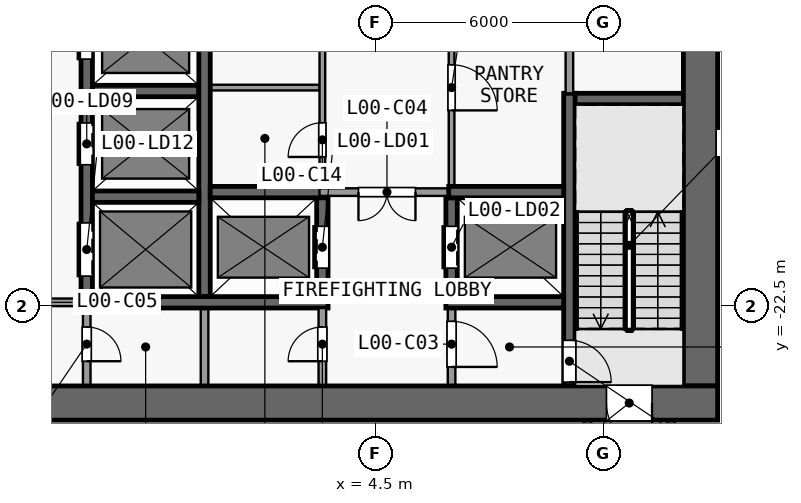
"""IFC4 building model, lengths in metres.
Left out: names, types, materials, properties, quantities, classifications, styles, units other than length and angle.
Written with IfcOpenShell. Run it as: python <this file> out.ifc"""

import sys

from ifc_helpers import new_model, si_unit, direction, frame, frame_2d, origin, place, context, subcontext, project, spatial, rectangle, extrude, element, fill, save


model = new_model("IFC4")
c1 = context("Model", 3, precision=1e-05, world=origin(), true_north=direction((0.0, 1.0)))
c2 = subcontext(c1, "Body", "Model", "MODEL_VIEW")
j1 = project(units=[si_unit("LENGTHUNIT", "METRE"), si_unit("PLANEANGLEUNIT", "RADIAN")], contexts=[c1])
p1 = place(None, origin())
s1 = spatial("IfcSite", under=j1, at=p1, CompositionType="ELEMENT")
p2 = place(p1, origin())
s2 = spatial("IfcBuilding", under=s1, at=p2, CompositionType="ELEMENT")
p3 = place(p2, origin())
s3 = spatial("IfcBuildingStorey", under=s2, at=p3, CompositionType="ELEMENT", Elevation=0.0)
p4 = place(p3, frame((13.5, -25.05, 0.0), z_axis=(0.0, 0.0, 1.0), x_axis=(-1.0, 0.0, 0.0)))
e1 = element("IfcWall", 1, at=p4, inside=s3, PredefinedType="SHEAR", context=c2, shape_type="SweptSolid", body=[
    extrude(rectangle(XDim=27.0, YDim=0.9, at=frame_2d((13.5, 0.0))), origin(), (0.0, 0.0, 1.0), 7.65),
])
p5 = place(p4, frame((24.075, 0.0, 0.0)))
e2 = element("IfcOpeningElement", 2, at=p5, cuts=e1, PredefinedType="OPENING", context=c2, shape_type="SweptSolid", body=[
    extrude(rectangle(XDim=1.2, YDim=2.1, at=frame_2d((0.6, 1.05))), frame((0.0, 0.46, 0.0), z_axis=(0.0, -1.0, 0.0), x_axis=(1.0, 0.0, 0.0)), (0.0, 0.0, 1.0), 0.92),
])
p6 = place(p4, frame((1.725, 0.0, 0.0)))
e3 = element("IfcOpeningElement", 3, at=p6, cuts=e1, PredefinedType="OPENING", context=c2, shape_type="SweptSolid", body=[
    extrude(rectangle(XDim=1.2, YDim=2.1, at=frame_2d((0.6, 1.05))), frame((0.0, 0.46, 0.0), z_axis=(0.0, -1.0, 0.0), x_axis=(1.0, 0.0, 0.0)), (0.0, 0.0, 1.0), 0.92),
])
p7 = place(p3, frame((13.05, -24.6, 0.0), z_axis=(0.0, 0.0, 1.0), x_axis=(0.0, 1.0, 0.0)))
e4 = element("IfcWall", 4, at=p7, inside=s3, PredefinedType="SHEAR", context=c2, shape_type="SweptSolid", body=[
    extrude(rectangle(XDim=16.1, YDim=0.9, at=frame_2d((8.05, 0.0))), origin(), (0.0, 0.0, 1.0), 7.65),
])
p8 = place(p3, frame((-3.25, -22.4, 0.0), z_axis=(0.0, 0.0, 1.0), x_axis=(-1.0, 0.0, 0.0)))
e5 = element("IfcWall", 5, at=p8, inside=s3, PredefinedType="PARTITIONING", context=c2, shape_type="SweptSolid", body=[
    extrude(rectangle(XDim=3.1, YDim=0.2, at=frame_2d((1.55, 0.0))), origin(), (0.0, 0.0, 1.0), 7.65),
])
p9 = place(p8, frame((0.8, 0.0, 0.0)))
e6 = element("IfcOpeningElement", 6, at=p9, cuts=e5, PredefinedType="OPENING", context=c2, shape_type="SweptSolid", body=[
    extrude(rectangle(XDim=1.5, YDim=2.1, at=frame_2d((0.75, 1.05))), frame((0.0, 0.11, 0.0), z_axis=(0.0, -1.0, 0.0), x_axis=(1.0, 0.0, 0.0)), (0.0, 0.0, 1.0), 0.22),
])
p10 = place(p3, frame((-2.95, -22.4, 0.0), z_axis=(0.0, 0.0, 1.0), x_axis=(1.0, 0.0, 0.0)))
e7 = element("IfcWall", 7, at=p10, inside=s3, PredefinedType="SHEAR", context=c2, shape_type="SweptSolid", body=[
    extrude(rectangle(XDim=6.2, YDim=0.3, at=frame_2d((3.1, 0.0))), origin(), (0.0, 0.0, 1.0), 7.65),
])
p11 = place(p3, frame((6.35, -22.4, 0.0), z_axis=(0.0, 0.0, 1.0), x_axis=(1.0, 0.0, 0.0)))
e8 = element("IfcWall", 8, at=p11, inside=s3, PredefinedType="SHEAR", context=c2, shape_type="SweptSolid", body=[
    extrude(rectangle(XDim=3.1, YDim=0.3, at=frame_2d((1.55, 0.0))), origin(), (0.0, 0.0, 1.0), 7.65),
])
p12 = place(p3, frame((-2.95, -19.62, 0.0), z_axis=(0.0, 0.0, 1.0), x_axis=(1.0, 0.0, 0.0)))
e9 = element("IfcWall", 9, at=p12, inside=s3, PredefinedType="SHEAR", context=c2, shape_type="SweptSolid", body=[
    extrude(rectangle(XDim=2.8, YDim=0.3, at=frame_2d((1.4, 0.0))), origin(), (0.0, 0.0, 1.0), 7.65),
])
p13 = place(p3, frame((0.15, -19.5, 0.0), z_axis=(0.0, 0.0, 1.0), x_axis=(1.0, 0.0, 0.0)))
e10 = element("IfcWall", 10, at=p13, inside=s3, PredefinedType="SHEAR", context=c2, shape_type="SweptSolid", body=[
    extrude(rectangle(XDim=3.025, YDim=0.3, at=frame_2d((1.513, 0.0))), origin(), (0.0, 0.0, 1.0), 7.65),
])
p14 = place(p3, frame((6.575, -19.5, 0.0), z_axis=(0.0, 0.0, 1.0), x_axis=(-1.0, 0.0, 0.0)))
e11 = element("IfcWall", 11, at=p14, inside=s3, PredefinedType="PARTITIONING", context=c2, shape_type="SweptSolid", body=[
    extrude(rectangle(XDim=3.55, YDim=0.2, at=frame_2d((1.775, 0.0))), origin(), (0.0, 0.0, 1.0), 7.65),
])
p15 = place(p14, frame((1.025, 0.0, 0.0)))
e12 = element("IfcOpeningElement", 12, at=p15, cuts=e11, PredefinedType="OPENING", context=c2, shape_type="SweptSolid", body=[
    extrude(rectangle(XDim=1.5, YDim=2.1, at=frame_2d((0.75, 1.05))), frame((0.0, 0.11, 0.0), z_axis=(0.0, -1.0, 0.0), x_axis=(1.0, 0.0, 0.0)), (0.0, 0.0, 1.0), 0.22),
])
p16 = place(p3, frame((6.425, -19.5, 0.0), z_axis=(0.0, 0.0, 1.0), x_axis=(1.0, 0.0, 0.0)))
e13 = element("IfcWall", 13, at=p16, inside=s3, PredefinedType="SHEAR", context=c2, shape_type="SweptSolid", body=[
    extrude(rectangle(XDim=3.025, YDim=0.3, at=frame_2d((1.512, 0.0))), origin(), (0.0, 0.0, 1.0), 7.65),
])
p17 = place(p3, frame((9.5, -17.05, 0.0), z_axis=(0.0, 0.0, 1.0), x_axis=(1.0, 0.0, 0.0)))
e14 = element("IfcWall", 14, at=p17, inside=s3, PredefinedType="SHEAR", context=c2, shape_type="SweptSolid", body=[
    extrude(rectangle(XDim=3.1, YDim=0.3, at=frame_2d((1.55, 0.0))), origin(), (0.0, 0.0, 1.0), 7.65),
])
p18 = place(p3, frame((-2.95, -16.84, 0.0), z_axis=(0.0, 0.0, 1.0), x_axis=(1.0, 0.0, 0.0)))
e15 = element("IfcWall", 15, at=p18, inside=s3, PredefinedType="SHEAR", context=c2, shape_type="SweptSolid", body=[
    extrude(rectangle(XDim=2.8, YDim=0.3, at=frame_2d((1.4, 0.0))), origin(), (0.0, 0.0, 1.0), 7.65),
])
p19 = place(p3, frame((0.15, -16.75, 0.0), z_axis=(0.0, 0.0, 1.0), x_axis=(1.0, 0.0, 0.0)))
e16 = element("IfcWall", 16, at=p19, inside=s3, PredefinedType="PARTITIONING", context=c2, shape_type="SweptSolid", body=[
    extrude(rectangle(XDim=2.875, YDim=0.15, at=frame_2d((1.438, 0.0))), origin(), (0.0, 0.0, 1.0), 7.65),
])
p20 = place(p3, frame((-3.1, -22.55, 0.0), z_axis=(0.0, 0.0, 1.0), x_axis=(0.0, -1.0, 0.0)))
e17 = element("IfcWall", 17, at=p20, inside=s3, PredefinedType="PARTITIONING", context=c2, shape_type="SweptSolid", body=[
    extrude(rectangle(XDim=2.05, YDim=0.2, at=frame_2d((1.025, 0.0))), origin(), (0.0, 0.0, 1.0), 7.65),
])
p21 = place(p20, frame((0.5, 0.0, 0.0)))
e18 = element("IfcOpeningElement", 18, at=p21, cuts=e17, PredefinedType="OPENING", context=c2, shape_type="SweptSolid", body=[
    extrude(rectangle(XDim=0.9, YDim=2.1, at=frame_2d((0.45, 1.05))), frame((0.0, 0.11, 0.0), z_axis=(0.0, -1.0, 0.0), x_axis=(1.0, 0.0, 0.0)), (0.0, 0.0, 1.0), 0.22),
])
p22 = place(p3, frame((-3.1, -22.55, 0.0), z_axis=(0.0, 0.0, 1.0), x_axis=(0.0, 1.0, 0.0)))
e19 = element("IfcWall", 19, at=p22, inside=s3, PredefinedType="SHEAR", context=c2, shape_type="SweptSolid", body=[
    extrude(rectangle(XDim=14.05, YDim=0.3, at=frame_2d((7.025, 0.0))), origin(), (0.0, 0.0, 1.0), 7.65),
])
p23 = place(p22, frame((12.11, 0.0, 0.0)))
e20 = element("IfcOpeningElement", 20, at=p23, cuts=e19, PredefinedType="OPENING", context=c2, shape_type="SweptSolid", body=[
    extrude(rectangle(XDim=1.1, YDim=2.1, at=frame_2d((0.55, 1.05))), frame((0.0, 0.16, 0.0), z_axis=(0.0, -1.0, 0.0), x_axis=(1.0, 0.0, 0.0)), (0.0, 0.0, 1.0), 0.32),
])
p24 = place(p22, frame((3.77, 0.0, 0.0)))
e21 = element("IfcOpeningElement", 21, at=p24, cuts=e19, PredefinedType="OPENING", context=c2, shape_type="SweptSolid", body=[
    extrude(rectangle(XDim=1.1, YDim=2.1, at=frame_2d((0.55, 1.05))), frame((0.0, 0.16, 0.0), z_axis=(0.0, -1.0, 0.0), x_axis=(1.0, 0.0, 0.0)), (0.0, 0.0, 1.0), 0.32),
])
p25 = place(p22, frame((6.55, 0.0, 0.0)))
e22 = element("IfcOpeningElement", 22, at=p25, cuts=e19, PredefinedType="OPENING", context=c2, shape_type="SweptSolid", body=[
    extrude(rectangle(XDim=1.1, YDim=2.1, at=frame_2d((0.55, 1.05))), frame((0.0, 0.16, 0.0), z_axis=(0.0, -1.0, 0.0), x_axis=(1.0, 0.0, 0.0)), (0.0, 0.0, 1.0), 0.32),
])
p26 = place(p22, frame((9.33, 0.0, 0.0)))
e23 = element("IfcOpeningElement", 23, at=p26, cuts=e19, PredefinedType="OPENING", context=c2, shape_type="SweptSolid", body=[
    extrude(rectangle(XDim=1.1, YDim=2.1, at=frame_2d((0.55, 1.05))), frame((0.0, 0.16, 0.0), z_axis=(0.0, -1.0, 0.0), x_axis=(1.0, 0.0, 0.0)), (0.0, 0.0, 1.0), 0.32),
])
p27 = place(p22, frame((0.84, 0.0, 0.0)))
e24 = element("IfcOpeningElement", 24, at=p27, cuts=e19, PredefinedType="OPENING", context=c2, shape_type="SweptSolid", body=[
    extrude(rectangle(XDim=1.4, YDim=2.1, at=frame_2d((0.7, 1.05))), frame((0.0, 0.16, 0.0), z_axis=(0.0, -1.0, 0.0), x_axis=(1.0, 0.0, 0.0)), (0.0, 0.0, 1.0), 0.32),
])
p28 = place(p3, frame((0.0, -24.6, 0.0), z_axis=(0.0, 0.0, 1.0), x_axis=(0.0, 1.0, 0.0)))
e25 = element("IfcWall", 25, at=p28, inside=s3, PredefinedType="PARTITIONING", context=c2, shape_type="SweptSolid", body=[
    extrude(rectangle(XDim=2.05, YDim=0.2, at=frame_2d((1.025, 0.0))), origin(), (0.0, 0.0, 1.0), 7.65),
])
p29 = place(p3, frame((0.0, -22.25, 0.0), z_axis=(0.0, 0.0, 1.0), x_axis=(0.0, 1.0, 0.0)))
e26 = element("IfcWall", 26, at=p29, inside=s3, PredefinedType="SHEAR", context=c2, shape_type="SweptSolid", body=[
    extrude(rectangle(XDim=13.75, YDim=0.3, at=frame_2d((6.875, 0.0))), origin(), (0.0, 0.0, 1.0), 7.65),
])
p30 = place(p3, frame((3.1, -24.6, 0.0), z_axis=(0.0, 0.0, 1.0), x_axis=(0.0, 1.0, 0.0)))
e27 = element("IfcWall", 27, at=p30, inside=s3, PredefinedType="PARTITIONING", context=c2, shape_type="SweptSolid", body=[
    extrude(rectangle(XDim=2.05, YDim=0.2, at=frame_2d((1.025, 0.0))), origin(), (0.0, 0.0, 1.0), 7.65),
])
p31 = place(p30, frame((0.65, 0.0, 0.0)))
e28 = element("IfcOpeningElement", 28, at=p31, cuts=e27, PredefinedType="OPENING", context=c2, shape_type="SweptSolid", body=[
    extrude(rectangle(XDim=0.9, YDim=2.1, at=frame_2d((0.45, 1.05))), frame((0.0, 0.11, 0.0), z_axis=(0.0, -1.0, 0.0), x_axis=(1.0, 0.0, 0.0)), (0.0, 0.0, 1.0), 0.22),
])
p32 = place(p3, frame((3.1, -22.25, 0.0), z_axis=(0.0, 0.0, 1.0), x_axis=(0.0, 1.0, 0.0)))
e29 = element("IfcWall", 29, at=p32, inside=s3, PredefinedType="SHEAR", context=c2, shape_type="SweptSolid", body=[
    extrude(rectangle(XDim=2.85, YDim=0.3, at=frame_2d((1.425, 0.0))), origin(), (0.0, 0.0, 1.0), 7.65),
])
p33 = place(p32, frame((0.75, 0.0, 0.0)))
e30 = element("IfcOpeningElement", 30, at=p33, cuts=e29, PredefinedType="OPENING", context=c2, shape_type="SweptSolid", body=[
    extrude(rectangle(XDim=1.1, YDim=2.1, at=frame_2d((0.55, 1.05))), frame((0.0, 0.16, 0.0), z_axis=(0.0, -1.0, 0.0), x_axis=(1.0, 0.0, 0.0)), (0.0, 0.0, 1.0), 0.32),
])
p34 = place(p3, frame((3.1, -19.4, 0.0), z_axis=(0.0, 0.0, 1.0), x_axis=(0.0, 1.0, 0.0)))
e31 = element("IfcWall", 31, at=p34, inside=s3, PredefinedType="PARTITIONING", context=c2, shape_type="SweptSolid", body=[
    extrude(rectangle(XDim=10.9, YDim=0.15, at=frame_2d((5.45, 0.0))), origin(), (0.0, 0.0, 1.0), 7.65),
])
p35 = place(p34, frame((0.825, 0.0, 0.0)))
e32 = element("IfcOpeningElement", 32, at=p35, cuts=e31, PredefinedType="OPENING", context=c2, shape_type="SweptSolid", body=[
    extrude(rectangle(XDim=0.9, YDim=2.1, at=frame_2d((0.45, 1.05))), frame((0.0, 0.085, 0.0), z_axis=(0.0, -1.0, 0.0), x_axis=(1.0, 0.0, 0.0)), (0.0, 0.0, 1.0), 0.17),
])
p36 = place(p34, frame((6.175, 0.0, 0.0)))
e33 = element("IfcOpeningElement", 33, at=p36, cuts=e31, PredefinedType="OPENING", context=c2, shape_type="SweptSolid", body=[
    extrude(rectangle(XDim=1.2, YDim=2.1, at=frame_2d((0.6, 1.05))), frame((0.0, 0.085, 0.0), z_axis=(0.0, -1.0, 0.0), x_axis=(1.0, 0.0, 0.0)), (0.0, 0.0, 1.0), 0.17),
])
p37 = place(p3, frame((6.5, -22.55, 0.0), z_axis=(0.0, 0.0, 1.0), x_axis=(0.0, -1.0, 0.0)))
e34 = element("IfcWall", 34, at=p37, inside=s3, PredefinedType="PARTITIONING", context=c2, shape_type="SweptSolid", body=[
    extrude(rectangle(XDim=2.05, YDim=0.2, at=frame_2d((1.025, 0.0))), origin(), (0.0, 0.0, 1.0), 7.65),
])
p38 = place(p37, frame((0.35, 0.0, 0.0)))
e35 = element("IfcOpeningElement", 35, at=p38, cuts=e34, PredefinedType="OPENING", context=c2, shape_type="SweptSolid", body=[
    extrude(rectangle(XDim=1.2, YDim=2.1, at=frame_2d((0.6, 1.05))), frame((0.0, 0.11, 0.0), z_axis=(0.0, -1.0, 0.0), x_axis=(1.0, 0.0, 0.0)), (0.0, 0.0, 1.0), 0.22),
])
p39 = place(p3, frame((6.5, -22.25, 0.0), z_axis=(0.0, 0.0, 1.0), x_axis=(0.0, 1.0, 0.0)))
e36 = element("IfcWall", 36, at=p39, inside=s3, PredefinedType="SHEAR", context=c2, shape_type="SweptSolid", body=[
    extrude(rectangle(XDim=2.6, YDim=0.3, at=frame_2d((1.3, 0.0))), origin(), (0.0, 0.0, 1.0), 7.65),
])
p40 = place(p39, frame((0.75, 0.0, 0.0)))
e37 = element("IfcOpeningElement", 37, at=p40, cuts=e36, PredefinedType="OPENING", context=c2, shape_type="SweptSolid", body=[
    extrude(rectangle(XDim=1.1, YDim=2.1, at=frame_2d((0.55, 1.05))), frame((0.0, 0.16, 0.0), z_axis=(0.0, -1.0, 0.0), x_axis=(1.0, 0.0, 0.0)), (0.0, 0.0, 1.0), 0.32),
])
p41 = place(p3, frame((6.5, -8.5, 0.0), z_axis=(0.0, 0.0, 1.0), x_axis=(0.0, -1.0, 0.0)))
e38 = element("IfcWall", 38, at=p41, inside=s3, PredefinedType="PARTITIONING", context=c2, shape_type="SweptSolid", body=[
    extrude(rectangle(XDim=10.85, YDim=0.15, at=frame_2d((5.425, 0.0))), origin(), (0.0, 0.0, 1.0), 7.65),
])
p42 = place(p41, frame((7.65, 0.0, 0.0)))
e39 = element("IfcOpeningElement", 39, at=p42, cuts=e38, PredefinedType="OPENING", context=c2, shape_type="SweptSolid", body=[
    extrude(rectangle(XDim=1.2, YDim=2.1, at=frame_2d((0.6, 1.05))), frame((0.0, 0.085, 0.0), z_axis=(0.0, -1.0, 0.0), x_axis=(1.0, 0.0, 0.0)), (0.0, 0.0, 1.0), 0.17),
])
p43 = place(p41, frame((2.15, 0.0, 0.0)))
e40 = element("IfcOpeningElement", 40, at=p43, cuts=e38, PredefinedType="OPENING", context=c2, shape_type="SweptSolid", body=[
    extrude(rectangle(XDim=1.2, YDim=2.1, at=frame_2d((0.6, 1.05))), frame((0.0, 0.085, 0.0), z_axis=(0.0, -1.0, 0.0), x_axis=(1.0, 0.0, 0.0)), (0.0, 0.0, 1.0), 0.17),
])
p44 = place(p3, frame((9.6, -16.9, 0.0), z_axis=(0.0, 0.0, 1.0), x_axis=(0.0, -1.0, 0.0)))
e41 = element("IfcWall", 41, at=p44, inside=s3, PredefinedType="SHEAR", context=c2, shape_type="SweptSolid", body=[
    extrude(rectangle(XDim=7.7, YDim=0.3, at=frame_2d((3.85, 0.0))), origin(), (0.0, 0.0, 1.0), 7.65),
])
p45 = place(p44, frame((6.5, 0.0, 0.0)))
e42 = element("IfcOpeningElement", 42, at=p45, cuts=e41, PredefinedType="OPENING", context=c2, shape_type="SweptSolid", body=[
    extrude(rectangle(XDim=1.1, YDim=2.1, at=frame_2d((0.55, 1.05))), frame((0.0, 0.16, 0.0), z_axis=(0.0, -1.0, 0.0), x_axis=(1.0, 0.0, 0.0)), (0.0, 0.0, 1.0), 0.32),
])
p46 = place(p3, frame((9.6, -16.9, 0.0), z_axis=(0.0, 0.0, 1.0), x_axis=(0.0, 1.0, 0.0)))
e43 = element("IfcWall", 43, at=p46, inside=s3, PredefinedType="PARTITIONING", context=c2, shape_type="SweptSolid", body=[
    extrude(rectangle(XDim=8.4, YDim=0.2, at=frame_2d((4.2, 0.0))), origin(), (0.0, 0.0, 1.0), 7.65),
])
p47 = place(p3, frame((10.075, -25.5, 0.0), z_axis=(0.0, 0.0, 1.0), x_axis=(0.0, -1.0, 0.0)))
e44 = element("IfcWall", 44, at=p47, inside=s3, PredefinedType="PARTITIONING", context=c2, shape_type="SweptSolid", body=[
    extrude(rectangle(XDim=8.85, YDim=0.2, at=frame_2d((4.425, 0.0))), origin(), (0.0, 0.0, 1.0), 7.65),
])
p48 = place(p47, frame((7.0, 0.0, 0.0)))
e45 = element("IfcOpeningElement", 45, at=p48, cuts=e44, PredefinedType="OPENING", context=c2, shape_type="SweptSolid", body=[
    extrude(rectangle(XDim=1.0, YDim=2.1, at=frame_2d((0.5, 1.05))), frame((0.0, 0.11, 0.0), z_axis=(0.0, -1.0, 0.0), x_axis=(1.0, 0.0, 0.0)), (0.0, 0.0, 1.0), 0.22),
])
p49 = place(p3, frame((12.275, -34.35, 0.0), z_axis=(0.0, 0.0, 1.0), x_axis=(0.0, 1.0, 0.0)))
e46 = element("IfcWall", 46, at=p49, inside=s3, PredefinedType="PARTITIONING", context=c2, shape_type="SweptSolid", body=[
    extrude(rectangle(XDim=8.85, YDim=0.2, at=frame_2d((4.425, 0.0))), origin(), (0.0, 0.0, 1.0), 7.65),
])
p50 = place(p49, frame((0.85, 0.0, 0.0)))
e47 = element("IfcOpeningElement", 47, at=p50, cuts=e46, PredefinedType="OPENING", context=c2, shape_type="SweptSolid", body=[
    extrude(rectangle(XDim=1.0, YDim=2.1, at=frame_2d((0.5, 1.05))), frame((0.0, 0.11, 0.0), z_axis=(0.0, -1.0, 0.0), x_axis=(1.0, 0.0, 0.0)), (0.0, 0.0, 1.0), 0.22),
])
p51 = place(p33, origin())
e48 = element("IfcDoor", 48, at=p51, inside=s3, OperationType="DOUBLE_DOOR_SLIDING", PredefinedType="DOOR", context=c2, shape_type="SweptSolid", body=[
    extrude(rectangle(XDim=1.1, YDim=2.1, at=frame_2d((0.55, 1.05))), frame((0.0, 0.025, 0.0), z_axis=(0.0, -1.0, 0.0), x_axis=(1.0, 0.0, 0.0)), (0.0, 0.0, 1.0), 0.05),
])
fill(e30, e48)
p52 = place(p40, origin())
e49 = element("IfcDoor", 49, at=p52, inside=s3, OperationType="DOUBLE_DOOR_SLIDING", PredefinedType="DOOR", context=c2, shape_type="SweptSolid", body=[
    extrude(rectangle(XDim=1.1, YDim=2.1, at=frame_2d((0.55, 1.05))), frame((0.0, 0.025, 0.0), z_axis=(0.0, -1.0, 0.0), x_axis=(1.0, 0.0, 0.0)), (0.0, 0.0, 1.0), 0.05),
])
fill(e37, e49)
p53 = place(p24, origin())
e50 = element("IfcDoor", 50, at=p53, inside=s3, OperationType="DOUBLE_DOOR_SLIDING", PredefinedType="DOOR", context=c2, shape_type="SweptSolid", body=[
    extrude(rectangle(XDim=1.1, YDim=2.1, at=frame_2d((0.55, 1.05))), frame((0.0, 0.025, 0.0), z_axis=(0.0, -1.0, 0.0), x_axis=(1.0, 0.0, 0.0)), (0.0, 0.0, 1.0), 0.05),
])
fill(e21, e50)
p54 = place(p25, origin())
e51 = element("IfcDoor", 51, at=p54, inside=s3, OperationType="DOUBLE_DOOR_SLIDING", PredefinedType="DOOR", context=c2, shape_type="SweptSolid", body=[
    extrude(rectangle(XDim=1.1, YDim=2.1, at=frame_2d((0.55, 1.05))), frame((0.0, 0.025, 0.0), z_axis=(0.0, -1.0, 0.0), x_axis=(1.0, 0.0, 0.0)), (0.0, 0.0, 1.0), 0.05),
])
fill(e22, e51)
p55 = place(p27, origin())
e52 = element("IfcDoor", 52, at=p55, inside=s3, OperationType="DOUBLE_DOOR_SLIDING", PredefinedType="DOOR", context=c2, shape_type="SweptSolid", body=[
    extrude(rectangle(XDim=1.4, YDim=2.1, at=frame_2d((0.7, 1.05))), frame((0.0, 0.025, 0.0), z_axis=(0.0, -1.0, 0.0), x_axis=(1.0, 0.0, 0.0)), (0.0, 0.0, 1.0), 0.05),
])
fill(e24, e52)
p56 = place(p6, origin())
e53 = element("IfcDoor", 53, at=p56, inside=s3, OperationType="SINGLE_SWING_LEFT", PredefinedType="DOOR", context=c2, shape_type="SweptSolid", body=[
    extrude(rectangle(XDim=1.2, YDim=2.1, at=frame_2d((0.6, 1.05))), frame((0.0, 0.025, 0.0), z_axis=(0.0, -1.0, 0.0), x_axis=(1.0, 0.0, 0.0)), (0.0, 0.0, 1.0), 0.05),
])
fill(e3, e53)
p57 = place(p38, origin())
e54 = element("IfcDoor", 54, at=p57, inside=s3, OperationType="SINGLE_SWING_RIGHT", PredefinedType="DOOR", context=c2, shape_type="SweptSolid", body=[
    extrude(rectangle(XDim=1.2, YDim=2.1, at=frame_2d((0.6, 1.05))), frame((0.0, 0.025, 0.0), z_axis=(0.0, -1.0, 0.0), x_axis=(1.0, 0.0, 0.0)), (0.0, 0.0, 1.0), 0.05),
])
fill(e35, e54)
p58 = place(p15, origin())
e55 = element("IfcDoor", 55, at=p58, inside=s3, OperationType="DOUBLE_DOOR_SINGLE_SWING", PredefinedType="DOOR", context=c2, shape_type="SweptSolid", body=[
    extrude(rectangle(XDim=1.5, YDim=2.1, at=frame_2d((0.75, 1.05))), frame((0.0, 0.025, 0.0), z_axis=(0.0, -1.0, 0.0), x_axis=(1.0, 0.0, 0.0)), (0.0, 0.0, 1.0), 0.05),
])
fill(e12, e55)
p59 = place(p31, origin())
e56 = element("IfcDoor", 56, at=p59, inside=s3, OperationType="SINGLE_SWING_LEFT", PredefinedType="DOOR", context=c2, shape_type="SweptSolid", body=[
    extrude(rectangle(XDim=0.9, YDim=2.1, at=frame_2d((0.45, 1.05))), frame((0.0, 0.025, 0.0), z_axis=(0.0, -1.0, 0.0), x_axis=(1.0, 0.0, 0.0)), (0.0, 0.0, 1.0), 0.05),
])
fill(e28, e56)
p60 = place(p21, origin())
e57 = element("IfcDoor", 57, at=p60, inside=s3, OperationType="SINGLE_SWING_RIGHT", PredefinedType="DOOR", context=c2, shape_type="SweptSolid", body=[
    extrude(rectangle(XDim=0.9, YDim=2.1, at=frame_2d((0.45, 1.05))), frame((0.0, 0.025, 0.0), z_axis=(0.0, -1.0, 0.0), x_axis=(1.0, 0.0, 0.0)), (0.0, 0.0, 1.0), 0.05),
])
fill(e18, e57)
p61 = place(p35, origin())
e58 = element("IfcDoor", 58, at=p61, inside=s3, OperationType="SINGLE_SWING_LEFT", PredefinedType="DOOR", context=c2, shape_type="SweptSolid", body=[
    extrude(rectangle(XDim=0.9, YDim=2.1, at=frame_2d((0.45, 1.05))), frame((0.0, 0.025, 0.0), z_axis=(0.0, -1.0, 0.0), x_axis=(1.0, 0.0, 0.0)), (0.0, 0.0, 1.0), 0.05),
])
fill(e32, e58)
p62 = place(p42, origin())
e59 = element("IfcDoor", 59, at=p62, inside=s3, OperationType="SINGLE_SWING_RIGHT", PredefinedType="DOOR", context=c2, shape_type="SweptSolid", body=[
    extrude(rectangle(XDim=1.2, YDim=2.1, at=frame_2d((0.6, 1.05))), frame((0.0, 0.025, 0.0), z_axis=(0.0, -1.0, 0.0), x_axis=(1.0, 0.0, 0.0)), (0.0, 0.0, 1.0), 0.05),
])
fill(e39, e59)
p63 = place(p45, origin())
e60 = element("IfcDoor", 60, at=p63, inside=s3, OperationType="SINGLE_SWING_RIGHT", PredefinedType="DOOR", context=c2, shape_type="SweptSolid", body=[
    extrude(rectangle(XDim=1.1, YDim=2.1, at=frame_2d((0.55, 1.05))), frame((0.0, 0.025, 0.0), z_axis=(0.0, -1.0, 0.0), x_axis=(1.0, 0.0, 0.0)), (0.0, 0.0, 1.0), 0.05),
])
fill(e42, e60)
save(model, sys.argv[1])
